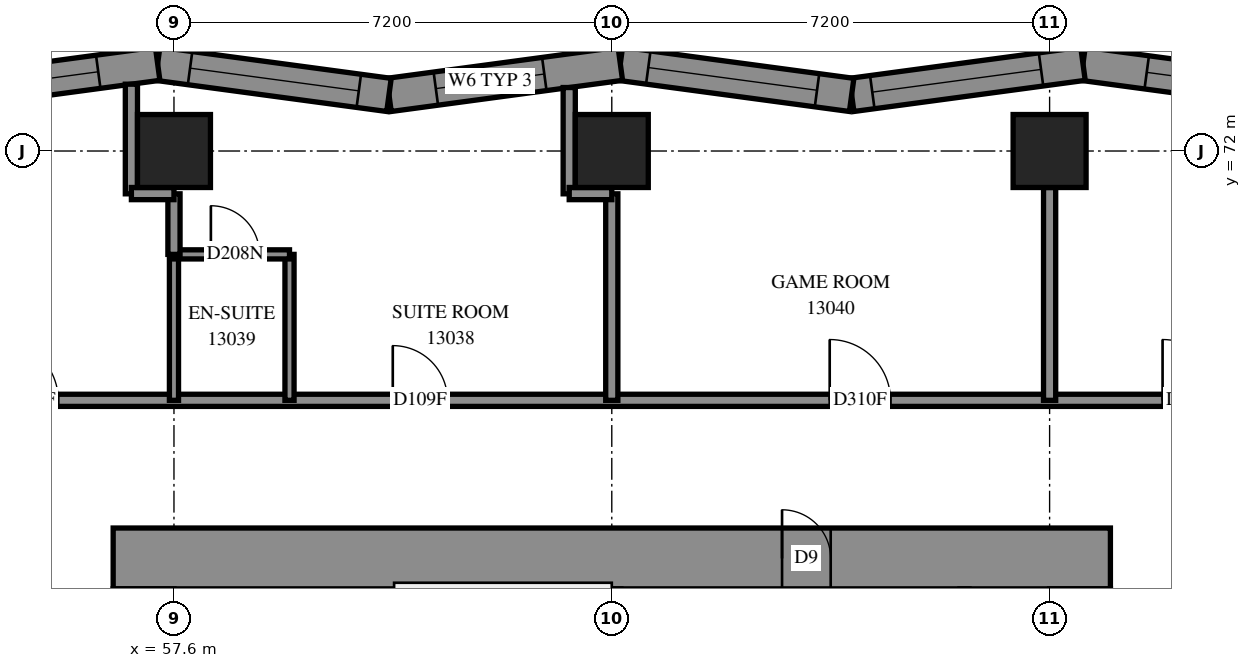
"""IFC4 building model, lengths in metres.
Left out: names, types, materials, properties, quantities, classifications, styles, units other than length and angle.
Written with IfcOpenShell. Run it as: python <this file> out.ifc"""

import sys

from ifc_helpers import new_model, si_unit, direction, frame, frame_2d, origin, origin_2d, place, context, subcontext, project, spatial, polyline, rectangle, outline, extrude, element, fill, save


model = new_model("IFC4")
c1 = context("Model", 3, precision=1e-05, world=origin(), true_north=direction((0.0, 1.0)))
c2 = subcontext(c1, "Body", "Model", "MODEL_VIEW")
j1 = project(units=[si_unit("LENGTHUNIT", "METRE"), si_unit("PLANEANGLEUNIT", "RADIAN")], contexts=[c1])
p1 = place(None, origin())
s1 = spatial("IfcSite", under=j1, at=p1, CompositionType="ELEMENT")
p2 = place(p1, origin())
s2 = spatial("IfcBuilding", under=s1, at=p2, CompositionType="ELEMENT")
p3 = place(p2, frame((0.0, 0.0, 50.8)))
s3 = spatial("IfcBuildingStorey", under=s2, at=p3, CompositionType="ELEMENT", Elevation=50.8)
for number, where, z_axis, x_axis in (
    (1, (57.6, 72.0, 0.0), (0.0, 0.0, 1.0), (1.0, 0.0, 0.0)),
    (2, (64.8, 72.0, 0.0), (0.0, 0.0, 1.0), (1.0, 0.0, 0.0)),
    (3, (72.0, 72.0, 0.0), (0.0, 0.0, 1.0), (1.0, 0.0, 0.0)),
):
    element("IfcColumn", number, at=place(p3, frame(where, z_axis=z_axis, x_axis=x_axis)), inside=s3, PredefinedType="COLUMN", context=c2, shape_type="SweptSolid", body=[
        extrude(rectangle(XDim=1.2, YDim=1.2, at=origin_2d()), origin(), (0.0, 0.0, 1.0), 3.1),
    ])
p4 = place(p3, frame((56.6, 65.3, -0.3), z_axis=(0.0, 0.0, 1.0), x_axis=(1.0, 0.0, 0.0)))
e4 = element("IfcWall", 4, at=p4, inside=s3, PredefinedType="SHEAR", context=c2, shape_type="SweptSolid", body=[
    extrude(rectangle(XDim=16.4, YDim=1.0, at=frame_2d((8.2, 0.0))), origin(), (0.0, 0.0, 1.0), 2.7),
])
p5 = place(p4, frame((11.0, 0.0, 0.3)))
e5 = element("IfcOpeningElement", 5, at=p5, cuts=e4, PredefinedType="OPENING", context=c2, shape_type="SweptSolid", body=[
    extrude(rectangle(XDim=0.8, YDim=2.1, at=frame_2d((0.4, 1.05))), frame((0.0, 0.51, 0.0), z_axis=(0.0, -1.0, 0.0), x_axis=(1.0, 0.0, 0.0)), (0.0, 0.0, 1.0), 1.02),
])
p6 = place(p3, frame((76.374, 72.92, 0.0), z_axis=(0.0, 0.0, 1.0), x_axis=(-0.9910665233, 0.1333684607, 0.0)))
e6 = element("IfcWall", 6, at=p6, inside=s3, PredefinedType="SOLIDWALL", context=c2, shape_type="SweptSolid", body=[
    extrude(outline(polyline([(0.058, -0.275), (3.897, -0.275), (3.823, 0.275), (-0.058, 0.275), (0.058, -0.275)])), origin(), (0.0, 0.0, 1.0), 3.1),
])
p7 = place(p6, frame((1.602, 0.0, 0.5)))
e7 = element("IfcOpeningElement", 7, at=p7, cuts=e6, PredefinedType="OPENING", context=c2, shape_type="SweptSolid", body=[
    extrude(rectangle(XDim=1.2, YDim=2.45, at=frame_2d((0.6, 1.225))), frame((0.0, 0.285, 0.0), z_axis=(0.0, -1.0, 0.0), x_axis=(1.0, 0.0, 0.0)), (0.0, 0.0, 1.0), 0.57),
])
p8 = place(p3, frame((72.549, 73.434, 0.0), z_axis=(0.0, 0.0, 1.0), x_axis=(-0.9910651652, -0.1333785524, 0.0)))
e8 = element("IfcWall", 8, at=p8, inside=s3, PredefinedType="SOLIDWALL", context=c2, shape_type="SweptSolid", body=[
    extrude(outline(polyline([(-0.037, -0.275), (3.802, -0.275), (3.876, 0.275), (0.037, 0.275), (-0.037, -0.275)])), origin(), (0.0, 0.0, 1.0), 3.1),
])
p9 = place(p8, frame((0.696, 0.0, 0.5)))
e9 = element("IfcOpeningElement", 9, at=p9, cuts=e8, PredefinedType="OPENING", context=c2, shape_type="SweptSolid", body=[
    extrude(rectangle(XDim=2.8, YDim=2.45, at=frame_2d((1.4, 1.225))), frame((0.0, 0.285, 0.0), z_axis=(0.0, -1.0, 0.0), x_axis=(1.0, 0.0, 0.0)), (0.0, 0.0, 1.0), 0.57),
])
p10 = place(p3, frame((68.745, 72.922, 0.0), z_axis=(0.0, 0.0, 1.0), x_axis=(-0.9910647018, 0.133381996, 0.0)))
e10 = element("IfcWall", 10, at=p10, inside=s3, PredefinedType="SOLIDWALL", context=c2, shape_type="SweptSolid", body=[
    extrude(outline(polyline([(0.037, -0.275), (3.876, -0.275), (3.802, 0.275), (-0.037, 0.275), (0.037, -0.275)])), origin(), (0.0, 0.0, 1.0), 3.1),
])
p11 = place(p10, frame((0.575, 0.0, 0.5)))
e11 = element("IfcOpeningElement", 11, at=p11, cuts=e10, PredefinedType="OPENING", context=c2, shape_type="SweptSolid", body=[
    extrude(rectangle(XDim=2.8, YDim=2.45, at=frame_2d((1.4, 1.225))), frame((0.0, 0.285, 0.0), z_axis=(0.0, -1.0, 0.0), x_axis=(1.0, 0.0, 0.0)), (0.0, 0.0, 1.0), 0.57),
])
p12 = place(p3, frame((64.94, 73.434, 0.0), z_axis=(0.0, 0.0, 1.0), x_axis=(-0.9910651652, -0.1333785524, 0.0)))
e12 = element("IfcWall", 12, at=p12, inside=s3, PredefinedType="SOLIDWALL", context=c2, shape_type="SweptSolid", body=[
    extrude(outline(polyline([(-0.037, -0.275), (3.802, -0.275), (3.876, 0.275), (0.037, 0.275), (-0.037, -0.275)])), origin(), (0.0, 0.0, 1.0), 3.1),
])
p13 = place(p12, frame((1.261, 0.0, 0.7)))
e13 = element("IfcOpeningElement", 13, at=p13, cuts=e12, PredefinedType="OPENING", context=c2, shape_type="SweptSolid", body=[
    extrude(rectangle(XDim=1.8, YDim=2.2, at=frame_2d((0.9, 1.1))), frame((0.0, 0.285, 0.0), z_axis=(0.0, -1.0, 0.0), x_axis=(1.0, 0.0, 0.0)), (0.0, 0.0, 1.0), 0.57),
])
p14 = place(p3, frame((61.136, 72.922, 0.0), z_axis=(0.0, 0.0, 1.0), x_axis=(-0.9910647018, 0.133381996, 0.0)))
e14 = element("IfcWall", 14, at=p14, inside=s3, PredefinedType="SOLIDWALL", context=c2, shape_type="SweptSolid", body=[
    extrude(outline(polyline([(0.037, -0.275), (3.876, -0.275), (3.802, 0.275), (-0.037, 0.275), (0.037, -0.275)])), origin(), (0.0, 0.0, 1.0), 3.1),
])
p15 = place(p14, frame((0.501, 0.0, 0.5)))
e15 = element("IfcOpeningElement", 15, at=p15, cuts=e14, PredefinedType="OPENING", context=c2, shape_type="SweptSolid", body=[
    extrude(rectangle(XDim=2.8, YDim=2.45, at=frame_2d((1.4, 1.225))), frame((0.0, 0.285, 0.0), z_axis=(0.0, -1.0, 0.0), x_axis=(1.0, 0.0, 0.0)), (0.0, 0.0, 1.0), 0.57),
])
p16 = place(p3, frame((57.332, 73.434, 0.0), z_axis=(0.0, 0.0, 1.0), x_axis=(-0.9910651652, -0.1333785524, 0.0)))
e16 = element("IfcWall", 16, at=p16, inside=s3, PredefinedType="SOLIDWALL", context=c2, shape_type="SweptSolid", body=[
    extrude(outline(polyline([(-0.037, -0.275), (3.802, -0.275), (3.876, 0.275), (0.037, 0.275), (-0.037, -0.275)])), origin(), (0.0, 0.0, 1.0), 3.1),
])
p17 = place(p16, frame((0.986, 0.0, 0.7)))
e17 = element("IfcOpeningElement", 17, at=p17, cuts=e16, PredefinedType="OPENING", context=c2, shape_type="SweptSolid", body=[
    extrude(rectangle(XDim=1.8, YDim=2.2, at=frame_2d((0.9, 1.1))), frame((0.0, 0.285, 0.0), z_axis=(0.0, -1.0, 0.0), x_axis=(1.0, 0.0, 0.0)), (0.0, 0.0, 1.0), 0.57),
])
p18 = place(p3, frame((54.5, 67.9, 0.0), z_axis=(0.0, 0.0, 1.0), x_axis=(1.0, 0.0, 0.0)))
e18 = element("IfcWall", 18, at=p18, inside=s3, PredefinedType="PARTITIONING", context=c2, shape_type="SweptSolid", body=[
    extrude(rectangle(XDim=20.6, YDim=0.2, at=frame_2d((10.3, 0.0))), origin(), (0.0, 0.0, 1.0), 3.1),
])
p19 = place(p18, frame((0.198, 0.0, 0.0)))
e19 = element("IfcOpeningElement", 19, at=p19, cuts=e18, PredefinedType="OPENING", context=c2, shape_type="SweptSolid", body=[
    extrude(rectangle(XDim=1.0, YDim=2.1, at=frame_2d((0.5, 1.05))), frame((0.0, 0.11, 0.0), z_axis=(0.0, -1.0, 0.0), x_axis=(1.0, 0.0, 0.0)), (0.0, 0.0, 1.0), 0.22),
])
p20 = place(p18, frame((19.358, 0.0, 0.0)))
e20 = element("IfcOpeningElement", 20, at=p20, cuts=e18, PredefinedType="OPENING", context=c2, shape_type="SweptSolid", body=[
    extrude(rectangle(XDim=1.0, YDim=2.1, at=frame_2d((0.5, 1.05))), frame((0.0, 0.11, 0.0), z_axis=(0.0, -1.0, 0.0), x_axis=(1.0, 0.0, 0.0)), (0.0, 0.0, 1.0), 0.22),
])
p21 = place(p18, frame((6.698, 0.0, 0.0)))
e21 = element("IfcOpeningElement", 21, at=p21, cuts=e18, PredefinedType="OPENING", context=c2, shape_type="SweptSolid", body=[
    extrude(rectangle(XDim=0.9, YDim=2.1, at=frame_2d((0.45, 1.05))), frame((0.0, 0.11, 0.0), z_axis=(0.0, -1.0, 0.0), x_axis=(1.0, 0.0, 0.0)), (0.0, 0.0, 1.0), 0.22),
])
p22 = place(p18, frame((13.884, 0.0, 0.0)))
e22 = element("IfcOpeningElement", 22, at=p22, cuts=e18, PredefinedType="OPENING", context=c2, shape_type="SweptSolid", body=[
    extrude(rectangle(XDim=1.0, YDim=2.1, at=frame_2d((0.5, 1.05))), frame((0.0, 0.11, 0.0), z_axis=(0.0, -1.0, 0.0), x_axis=(1.0, 0.0, 0.0)), (0.0, 0.0, 1.0), 0.22),
])
p23 = place(p3, frame((72.0, 67.9, 0.0), z_axis=(0.0, 0.0, 1.0), x_axis=(0.0, 1.0, 0.0)))
e23 = element("IfcWall", 23, at=p23, inside=s3, PredefinedType="PARTITIONING", context=c2, shape_type="SweptSolid", body=[
    extrude(rectangle(XDim=3.5, YDim=0.2, at=frame_2d((1.75, 0.0))), origin(), (0.0, 0.0, 1.0), 3.1),
])
p24 = place(p3, frame((64.8, 67.9, 0.0), z_axis=(0.0, 0.0, 1.0), x_axis=(0.0, 1.0, 0.0)))
e24 = element("IfcWall", 24, at=p24, inside=s3, PredefinedType="PARTITIONING", context=c2, shape_type="SweptSolid", body=[
    extrude(rectangle(XDim=3.396, YDim=0.2, at=frame_2d((1.698, 0.0))), origin(), (0.0, 0.0, 1.0), 3.1),
])
for number, where, z_axis, x_axis in (
    (25, (59.5, 67.9, 0.0), (0.0, 0.0, 1.0), (0.0, 1.0, 0.0)),
    (26, (57.6, 67.9, 0.0), (0.0, 0.0, 1.0), (0.0, 1.0, 0.0)),
):
    element("IfcWall", number, at=place(p3, frame(where, z_axis=z_axis, x_axis=x_axis)), inside=s3, PredefinedType="PARTITIONING", context=c2, shape_type="SweptSolid", body=[
        extrude(rectangle(XDim=2.4, YDim=0.15, at=frame_2d((1.2, 0.0))), origin(), (0.0, 0.0, 1.0), 3.1),
    ])
p25 = place(p3, frame((57.6, 70.3, 0.0), z_axis=(0.0, 0.0, 1.0), x_axis=(1.0, 0.0, 0.0)))
e27 = element("IfcWall", 27, at=p25, inside=s3, PredefinedType="PARTITIONING", context=c2, shape_type="SweptSolid", body=[
    extrude(rectangle(XDim=1.9, YDim=0.15, at=frame_2d((0.95, 0.0))), origin(), (0.0, 0.0, 1.0), 3.1),
])
p26 = place(p25, frame((0.607, 0.0, 0.0)))
e28 = element("IfcOpeningElement", 28, at=p26, cuts=e27, PredefinedType="OPENING", context=c2, shape_type="SweptSolid", body=[
    extrude(rectangle(XDim=0.8, YDim=2.1, at=frame_2d((0.4, 1.05))), frame((0.0, 0.085, 0.0), z_axis=(0.0, -1.0, 0.0), x_axis=(1.0, 0.0, 0.0)), (0.0, 0.0, 1.0), 0.17),
])
p27 = place(p3, frame((56.9, 71.296, 0.0), z_axis=(0.0, 0.0, 1.0), x_axis=(0.0, 1.0, 0.0)))
e29 = element("IfcWall", 29, at=p27, inside=s3, PredefinedType="PARTITIONING", context=c2, shape_type="SweptSolid", body=[
    extrude(rectangle(XDim=1.803, YDim=0.2, at=frame_2d((0.901, 0.0))), origin(), (0.0, 0.0, 1.0), 3.1),
])
p28 = place(p3, frame((64.1, 71.296, 0.0), z_axis=(0.0, 0.0, 1.0), x_axis=(0.0, 1.0, 0.0)))
e30 = element("IfcWall", 30, at=p28, inside=s3, PredefinedType="PARTITIONING", context=c2, shape_type="SweptSolid", body=[
    extrude(rectangle(XDim=1.748, YDim=0.2, at=frame_2d((0.874, 0.0))), origin(), (0.0, 0.0, 1.0), 3.1),
])
p29 = place(p3, frame((57.6, 70.3, 0.0), z_axis=(0.0, 0.0, 1.0), x_axis=(0.0, 1.0, 0.0)))
e31 = element("IfcWall", 31, at=p29, inside=s3, PredefinedType="PARTITIONING", context=c2, shape_type="SweptSolid", body=[
    extrude(rectangle(XDim=0.996, YDim=0.2, at=frame_2d((0.498, 0.0))), origin(), (0.0, 0.0, 1.0), 3.1),
])
for number, where, z_axis, x_axis in (
    (32, (56.9, 71.3, 0.0), (0.0, 0.0, 1.0), (1.0, 0.0, 0.0)),
    (33, (64.1, 71.3, 0.0), (0.0, 0.0, 1.0), (1.0, 0.0, 0.0)),
):
    element("IfcWall", number, at=place(p3, frame(where, z_axis=z_axis, x_axis=x_axis)), inside=s3, PredefinedType="PARTITIONING", context=c2, shape_type="SweptSolid", body=[
        extrude(rectangle(XDim=0.7, YDim=0.2, at=frame_2d((0.35, 0.0))), origin(), (0.0, 0.0, 1.0), 3.1),
    ])
p30 = place(p7, origin())
e34 = element("IfcWindow", 34, at=p30, inside=s3, PartitioningType="SINGLE_PANEL", PredefinedType="WINDOW", context=c2, shape_type="SweptSolid", body=[
    extrude(rectangle(XDim=1.2, YDim=2.45, at=frame_2d((0.6, 1.225))), frame((0.0, 0.155, 0.0), z_axis=(0.0, -1.0, 0.0), x_axis=(1.0, 0.0, 0.0)), (0.0, 0.0, 1.0), 0.06),
])
fill(e7, e34)
p31 = place(p9, origin())
e35 = element("IfcWindow", 35, at=p31, inside=s3, PartitioningType="SINGLE_PANEL", PredefinedType="WINDOW", context=c2, shape_type="SweptSolid", body=[
    extrude(rectangle(XDim=2.8, YDim=2.45, at=frame_2d((1.4, 1.225))), frame((0.0, 0.155, 0.0), z_axis=(0.0, -1.0, 0.0), x_axis=(1.0, 0.0, 0.0)), (0.0, 0.0, 1.0), 0.06),
])
fill(e9, e35)
p32 = place(p11, origin())
e36 = element("IfcWindow", 36, at=p32, inside=s3, PartitioningType="SINGLE_PANEL", PredefinedType="WINDOW", context=c2, shape_type="SweptSolid", body=[
    extrude(rectangle(XDim=2.8, YDim=2.45, at=frame_2d((1.4, 1.225))), frame((0.0, 0.155, 0.0), z_axis=(0.0, -1.0, 0.0), x_axis=(1.0, 0.0, 0.0)), (0.0, 0.0, 1.0), 0.06),
])
fill(e11, e36)
p33 = place(p15, origin())
e37 = element("IfcWindow", 37, at=p33, inside=s3, PartitioningType="SINGLE_PANEL", PredefinedType="WINDOW", context=c2, shape_type="SweptSolid", body=[
    extrude(rectangle(XDim=2.8, YDim=2.45, at=frame_2d((1.4, 1.225))), frame((0.0, 0.155, 0.0), z_axis=(0.0, -1.0, 0.0), x_axis=(1.0, 0.0, 0.0)), (0.0, 0.0, 1.0), 0.06),
])
fill(e15, e37)
p34 = place(p5, origin())
e38 = element("IfcDoor", 38, at=p34, inside=s3, OperationType="SINGLE_SWING_RIGHT", PredefinedType="DOOR", context=c2, shape_type="SweptSolid", body=[
    extrude(rectangle(XDim=0.8, YDim=2.1, at=frame_2d((0.4, 1.05))), frame((0.0, -0.44, 0.0), z_axis=(0.0, -1.0, 0.0), x_axis=(1.0, 0.0, 0.0)), (0.0, 0.0, 1.0), 0.05),
])
fill(e5, e38)
p35 = place(p19, origin())
e39 = element("IfcDoor", 39, at=p35, inside=s3, OperationType="SINGLE_SWING_LEFT", PredefinedType="DOOR", context=c2, shape_type="SweptSolid", body=[
    extrude(rectangle(XDim=1.0, YDim=2.1, at=frame_2d((0.5, 1.05))), frame((0.0, 0.025, 0.0), z_axis=(0.0, -1.0, 0.0), x_axis=(1.0, 0.0, 0.0)), (0.0, 0.0, 1.0), 0.05),
])
fill(e19, e39)
p36 = place(p20, origin())
e40 = element("IfcDoor", 40, at=p36, inside=s3, OperationType="SINGLE_SWING_RIGHT", PredefinedType="DOOR", context=c2, shape_type="SweptSolid", body=[
    extrude(rectangle(XDim=1.0, YDim=2.1, at=frame_2d((0.5, 1.05))), frame((0.0, 0.025, 0.0), z_axis=(0.0, -1.0, 0.0), x_axis=(1.0, 0.0, 0.0)), (0.0, 0.0, 1.0), 0.05),
])
fill(e20, e40)
p37 = place(p21, origin())
e41 = element("IfcDoor", 41, at=p37, inside=s3, OperationType="SINGLE_SWING_RIGHT", PredefinedType="DOOR", context=c2, shape_type="SweptSolid", body=[
    extrude(rectangle(XDim=0.9, YDim=2.1, at=frame_2d((0.45, 1.05))), frame((0.0, 0.025, 0.0), z_axis=(0.0, -1.0, 0.0), x_axis=(1.0, 0.0, 0.0)), (0.0, 0.0, 1.0), 0.05),
])
fill(e21, e41)
p38 = place(p26, origin())
e42 = element("IfcDoor", 42, at=p38, inside=s3, OperationType="SINGLE_SWING_RIGHT", PredefinedType="DOOR", context=c2, shape_type="SweptSolid", body=[
    extrude(rectangle(XDim=0.8, YDim=2.1, at=frame_2d((0.4, 1.05))), frame((0.0, 0.025, 0.0), z_axis=(0.0, -1.0, 0.0), x_axis=(1.0, 0.0, 0.0)), (0.0, 0.0, 1.0), 0.05),
])
fill(e28, e42)
p39 = place(p22, origin())
e43 = element("IfcDoor", 43, at=p39, inside=s3, OperationType="SINGLE_SWING_RIGHT", PredefinedType="DOOR", context=c2, shape_type="SweptSolid", body=[
    extrude(rectangle(XDim=1.0, YDim=2.1, at=frame_2d((0.5, 1.05))), frame((0.0, 0.025, 0.0), z_axis=(0.0, -1.0, 0.0), x_axis=(1.0, 0.0, 0.0)), (0.0, 0.0, 1.0), 0.05),
])
fill(e22, e43)
p40 = place(p13, origin())
e44 = element("IfcWindow", 44, at=p40, inside=s3, PartitioningType="SINGLE_PANEL", PredefinedType="WINDOW", context=c2, shape_type="SweptSolid", body=[
    extrude(rectangle(XDim=1.8, YDim=2.2, at=frame_2d((0.9, 1.1))), frame((0.0, 0.155, 0.0), z_axis=(0.0, -1.0, 0.0), x_axis=(1.0, 0.0, 0.0)), (0.0, 0.0, 1.0), 0.06),
])
fill(e13, e44)
p41 = place(p17, origin())
e45 = element("IfcWindow", 45, at=p41, inside=s3, PartitioningType="SINGLE_PANEL", PredefinedType="WINDOW", context=c2, shape_type="SweptSolid", body=[
    extrude(rectangle(XDim=1.8, YDim=2.2, at=frame_2d((0.9, 1.1))), frame((0.0, 0.155, 0.0), z_axis=(0.0, -1.0, 0.0), x_axis=(1.0, 0.0, 0.0)), (0.0, 0.0, 1.0), 0.06),
])
fill(e17, e45)
save(model, sys.argv[1])
